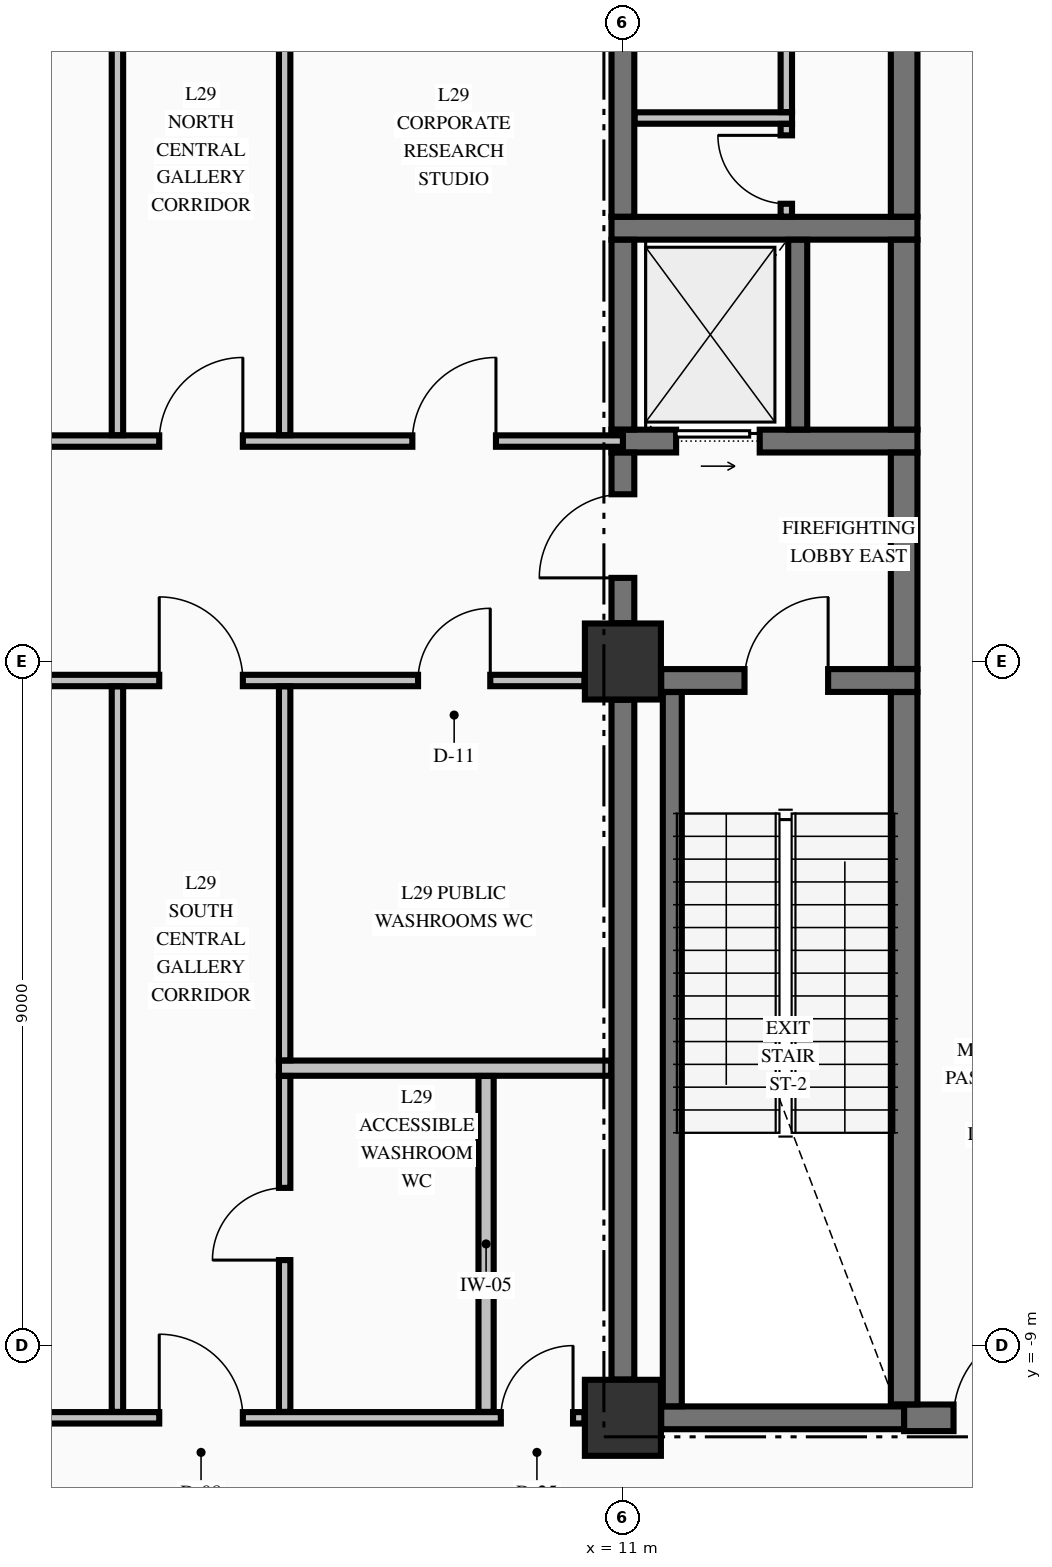
"""IFC4 building model, lengths in metres.
Left out: names, types, materials, properties, quantities, classifications, styles, units other than length and angle.
Written with IfcOpenShell. Run it as: python <this file> out.ifc"""

import sys

from ifc_helpers import new_model, si_unit, direction, frame, frame_2d, origin, origin_2d, place, context, subcontext, project, spatial, rectangle, extrude, element, fill, save


model = new_model("IFC4")
c1 = context("Model", 3, precision=1e-05, world=origin(), true_north=direction((0.0, 1.0)))
c2 = subcontext(c1, "Body", "Model", "MODEL_VIEW")
j1 = project(units=[si_unit("LENGTHUNIT", "METRE"), si_unit("PLANEANGLEUNIT", "RADIAN")], contexts=[c1])
p1 = place(None, origin())
s1 = spatial("IfcSite", under=j1, at=p1, CompositionType="ELEMENT")
p2 = place(p1, origin())
s2 = spatial("IfcBuilding", under=s1, at=p2, CompositionType="ELEMENT")
p3 = place(p2, frame((0.0, 0.0, 116.35)))
s3 = spatial("IfcBuildingStorey", under=s2, at=p3, CompositionType="ELEMENT", Elevation=116.35)
for number, where, z_axis, x_axis in (
    (1, (11.0, -9.95, -0.425), (0.0, 0.0, 1.0), (1.0, 0.0, 0.0)),
    (2, (11.0, 0.0, -0.425), (0.0, 0.0, 1.0), (1.0, 0.0, 0.0)),
):
    element("IfcColumn", number, at=place(p3, frame(where, z_axis=z_axis, x_axis=x_axis)), inside=s3, PredefinedType="COLUMN", context=c2, shape_type="SweptSolid", body=[
        extrude(rectangle(XDim=1.0, YDim=1.0, at=origin_2d()), origin(), (0.0, 0.0, 1.0), 5.0),
    ])
p4 = place(p3, frame((11.504, -9.95, 0.0), z_axis=(0.0, 0.0, 1.0), x_axis=(1.0, 0.0, 0.0)))
e3 = element("IfcWall", 3, at=p4, inside=s3, PredefinedType="SHEAR", context=c2, shape_type="SweptSolid", body=[
    extrude(rectangle(XDim=3.196, YDim=0.3, at=frame_2d((1.598, 0.0))), origin(), (0.0, 0.0, 1.0), 4.575),
])
p5 = place(p3, frame((14.7, -9.95, 0.0), z_axis=(0.0, 0.0, 1.0), x_axis=(1.0, 0.0, 0.0)))
e4 = element("IfcWall", 4, at=p5, inside=s3, PredefinedType="SHEAR", context=c2, shape_type="SweptSolid", body=[
    extrude(rectangle(XDim=4.796, YDim=0.35, at=frame_2d((2.398, 0.0))), origin(), (0.0, 0.0, 1.0), 4.575),
])
p6 = place(p5, frame((0.65, 0.0, 0.0)))
e5 = element("IfcOpeningElement", 5, at=p6, cuts=e4, PredefinedType="OPENING", context=c2, shape_type="SweptSolid", body=[
    extrude(rectangle(XDim=1.2, YDim=2.15, at=frame_2d((0.6, 1.075))), frame((0.0, 0.185, 0.0), z_axis=(0.0, -1.0, 0.0), x_axis=(1.0, 0.0, 0.0)), (0.0, 0.0, 1.0), 0.37),
])
p7 = place(p3, frame((11.504, -0.25, 0.0), z_axis=(0.0, 0.0, 1.0), x_axis=(1.0, 0.0, 0.0)))
e6 = element("IfcWall", 6, at=p7, inside=s3, PredefinedType="SHEAR", context=c2, shape_type="SweptSolid", body=[
    extrude(rectangle(XDim=3.371, YDim=0.3, at=frame_2d((1.686, 0.0))), origin(), (0.0, 0.0, 1.0), 4.575),
])
p8 = place(p7, frame((1.096, 0.0, 0.0)))
e7 = element("IfcOpeningElement", 7, at=p8, cuts=e6, PredefinedType="OPENING", context=c2, shape_type="SweptSolid", body=[
    extrude(rectangle(XDim=1.1, YDim=2.15, at=frame_2d((0.55, 1.075))), frame((0.0, 0.16, 0.0), z_axis=(0.0, -1.0, 0.0), x_axis=(1.0, 0.0, 0.0)), (0.0, 0.0, 1.0), 0.32),
])
p9 = place(p3, frame((10.85, 2.9, 0.0), z_axis=(0.0, 0.0, 1.0), x_axis=(1.0, 0.0, 0.0)))
e8 = element("IfcWall", 8, at=p9, inside=s3, PredefinedType="SHEAR", context=c2, shape_type="SweptSolid", body=[
    extrude(rectangle(XDim=4.025, YDim=0.3, at=frame_2d((2.012, 0.0))), origin(), (0.0, 0.0, 1.0), 4.575),
])
p10 = place(p9, frame((0.85, 0.0, 0.0)))
e9 = element("IfcOpeningElement", 9, at=p10, cuts=e8, PredefinedType="OPENING", context=c2, shape_type="SweptSolid", body=[
    extrude(rectangle(XDim=1.1, YDim=2.2, at=frame_2d((0.55, 1.1))), frame((0.0, 0.16, 0.0), z_axis=(0.0, -1.0, 0.0), x_axis=(1.0, 0.0, 0.0)), (0.0, 0.0, 1.0), 0.32),
])
p11 = place(p3, frame((10.85, 5.7, 0.0), z_axis=(0.0, 0.0, 1.0), x_axis=(1.0, 0.0, 0.0)))
e10 = element("IfcWall", 10, at=p11, inside=s3, PredefinedType="SHEAR", context=c2, shape_type="SweptSolid", body=[
    extrude(rectangle(XDim=4.025, YDim=0.3, at=frame_2d((2.012, 0.0))), origin(), (0.0, 0.0, 1.0), 4.575),
])
p12 = place(p3, frame((-10.494, -9.95, 0.0), z_axis=(0.0, 0.0, 1.0), x_axis=(1.0, 0.0, 0.0)))
e11 = element("IfcWall", 11, at=p12, inside=s3, PredefinedType="PARTITIONING", context=c2, shape_type="SweptSolid", body=[
    extrude(rectangle(XDim=20.988, YDim=0.15, at=frame_2d((10.494, 0.0))), origin(), (0.0, 0.0, 1.0), 4.575),
])
p13 = place(p12, frame((15.394, 0.0, 0.0)))
e12 = element("IfcOpeningElement", 12, at=p13, cuts=e11, PredefinedType="OPENING", context=c2, shape_type="SweptSolid", body=[
    extrude(rectangle(XDim=1.1, YDim=2.15, at=frame_2d((0.55, 1.075))), frame((0.0, 0.085, 0.0), z_axis=(0.0, -1.0, 0.0), x_axis=(1.0, 0.0, 0.0)), (0.0, 0.0, 1.0), 0.17),
])
p14 = place(p12, frame((19.888, 0.0, 0.0)))
e13 = element("IfcOpeningElement", 13, at=p14, cuts=e11, PredefinedType="OPENING", context=c2, shape_type="SweptSolid", body=[
    extrude(rectangle(XDim=0.95, YDim=2.02, at=frame_2d((0.475, 1.01))), frame((0.0, 0.085, 0.0), z_axis=(0.0, -1.0, 0.0), x_axis=(1.0, 0.0, 0.0)), (0.0, 0.0, 1.0), 0.17),
])
p15 = place(p3, frame((6.475, -5.35, 0.0), z_axis=(0.0, 0.0, 1.0), x_axis=(1.0, 0.0, 0.0)))
e14 = element("IfcWall", 14, at=p15, inside=s3, PredefinedType="PARTITIONING", context=c2, shape_type="SweptSolid", body=[
    extrude(rectangle(XDim=4.372, YDim=0.2, at=frame_2d((2.186, 0.0))), origin(), (0.0, 0.0, 1.0), 4.575),
])
p16 = place(p3, frame((-10.494, -0.25, 0.0), z_axis=(0.0, 0.0, 1.0), x_axis=(1.0, 0.0, 0.0)))
e15 = element("IfcWall", 15, at=p16, inside=s3, PredefinedType="PARTITIONING", context=c2, shape_type="SweptSolid", body=[
    extrude(rectangle(XDim=20.988, YDim=0.15, at=frame_2d((10.494, 0.0))), origin(), (0.0, 0.0, 1.0), 4.575),
])
p17 = place(p16, frame((15.394, 0.0, 0.0)))
e16 = element("IfcOpeningElement", 16, at=p17, cuts=e15, PredefinedType="OPENING", context=c2, shape_type="SweptSolid", body=[
    extrude(rectangle(XDim=1.1, YDim=2.15, at=frame_2d((0.55, 1.075))), frame((0.0, 0.085, 0.0), z_axis=(0.0, -1.0, 0.0), x_axis=(1.0, 0.0, 0.0)), (0.0, 0.0, 1.0), 0.17),
])
p18 = place(p16, frame((6.639, 0.0, 0.0)))
e17 = element("IfcOpeningElement", 17, at=p18, cuts=e15, PredefinedType="OPENING", context=c2, shape_type="SweptSolid", body=[
    extrude(rectangle(XDim=1.05, YDim=2.15, at=frame_2d((0.525, 1.075))), frame((0.0, 0.085, 0.0), z_axis=(0.0, -1.0, 0.0), x_axis=(1.0, 0.0, 0.0)), (0.0, 0.0, 1.0), 0.17),
])
p19 = place(p16, frame((18.799, 0.0, 0.0)))
e18 = element("IfcOpeningElement", 18, at=p19, cuts=e15, PredefinedType="OPENING", context=c2, shape_type="SweptSolid", body=[
    extrude(rectangle(XDim=0.95, YDim=2.15, at=frame_2d((0.475, 1.075))), frame((0.0, 0.085, 0.0), z_axis=(0.0, -1.0, 0.0), x_axis=(1.0, 0.0, 0.0)), (0.0, 0.0, 1.0), 0.17),
])
p20 = place(p3, frame((-11.0, 2.9, 0.0), z_axis=(0.0, 0.0, 1.0), x_axis=(1.0, 0.0, 0.0)))
e19 = element("IfcWall", 19, at=p20, inside=s3, PredefinedType="PARTITIONING", context=c2, shape_type="SweptSolid", body=[
    extrude(rectangle(XDim=22.0, YDim=0.15, at=frame_2d((11.0, 0.0))), origin(), (0.0, 0.0, 1.0), 4.575),
])
p21 = place(p20, frame((15.9, 0.0, 0.0)))
e20 = element("IfcOpeningElement", 20, at=p21, cuts=e19, PredefinedType="OPENING", context=c2, shape_type="SweptSolid", body=[
    extrude(rectangle(XDim=1.1, YDim=2.15, at=frame_2d((0.55, 1.075))), frame((0.0, 0.085, 0.0), z_axis=(0.0, -1.0, 0.0), x_axis=(1.0, 0.0, 0.0)), (0.0, 0.0, 1.0), 0.17),
])
p22 = place(p20, frame((7.145, 0.0, 0.0)))
e21 = element("IfcOpeningElement", 21, at=p22, cuts=e19, PredefinedType="OPENING", context=c2, shape_type="SweptSolid", body=[
    extrude(rectangle(XDim=1.05, YDim=2.15, at=frame_2d((0.525, 1.075))), frame((0.0, 0.085, 0.0), z_axis=(0.0, -1.0, 0.0), x_axis=(1.0, 0.0, 0.0)), (0.0, 0.0, 1.0), 0.17),
])
p23 = place(p20, frame((19.23, 0.0, 0.0)))
e22 = element("IfcOpeningElement", 22, at=p23, cuts=e19, PredefinedType="OPENING", context=c2, shape_type="SweptSolid", body=[
    extrude(rectangle(XDim=1.1, YDim=2.15, at=frame_2d((0.55, 1.075))), frame((0.0, 0.085, 0.0), z_axis=(0.0, -1.0, 0.0), x_axis=(1.0, 0.0, 0.0)), (0.0, 0.0, 1.0), 0.17),
])
p24 = place(p3, frame((11.153, 7.15, 0.0), z_axis=(0.0, 0.0, 1.0), x_axis=(1.0, 0.0, 0.0)))
e23 = element("IfcWall", 23, at=p24, inside=s3, PredefinedType="PARTITIONING", context=c2, shape_type="SweptSolid", body=[
    extrude(rectangle(XDim=2.072, YDim=0.15, at=frame_2d((1.036, 0.0))), origin(), (0.0, 0.0, 1.0), 4.575),
])
p25 = place(p3, frame((11.0, -9.446, 0.0), z_axis=(0.0, 0.0, 1.0), x_axis=(0.0, 1.0, 0.0)))
e24 = element("IfcWall", 24, at=p25, inside=s3, PredefinedType="SHEAR", context=c2, shape_type="SweptSolid", body=[
    extrude(rectangle(XDim=8.942, YDim=0.3, at=frame_2d((4.471, 0.0))), origin(), (0.0, 0.0, 1.0), 4.575),
])
p26 = place(p3, frame((11.0, 0.504, 0.0), z_axis=(0.0, 0.0, 1.0), x_axis=(0.0, 1.0, 0.0)))
e25 = element("IfcWall", 25, at=p26, inside=s3, PredefinedType="SHEAR", context=c2, shape_type="SweptSolid", body=[
    extrude(rectangle(XDim=2.244, YDim=0.3, at=frame_2d((1.122, 0.0))), origin(), (0.0, 0.0, 1.0), 4.575),
])
p27 = place(p26, frame((0.596, 0.0, 0.0)))
e26 = element("IfcOpeningElement", 26, at=p27, cuts=e25, PredefinedType="OPENING", context=c2, shape_type="SweptSolid", body=[
    extrude(rectangle(XDim=1.1, YDim=2.15, at=frame_2d((0.55, 1.075))), frame((0.0, 0.16, 0.0), z_axis=(0.0, -1.0, 0.0), x_axis=(1.0, 0.0, 0.0)), (0.0, 0.0, 1.0), 0.32),
])
p28 = place(p3, frame((11.0, 3.052, 0.0), z_axis=(0.0, 0.0, 1.0), x_axis=(0.0, 1.0, 0.0)))
e27 = element("IfcWall", 27, at=p28, inside=s3, PredefinedType="SHEAR", context=c2, shape_type="SweptSolid", body=[
    extrude(rectangle(XDim=2.496, YDim=0.3, at=frame_2d((1.248, 0.0))), origin(), (0.0, 0.0, 1.0), 4.575),
])
p29 = place(p3, frame((11.0, 5.852, 0.0), z_axis=(0.0, 0.0, 1.0), x_axis=(0.0, 1.0, 0.0)))
e28 = element("IfcWall", 28, at=p29, inside=s3, PredefinedType="SHEAR", context=c2, shape_type="SweptSolid", body=[
    extrude(rectangle(XDim=4.144, YDim=0.3, at=frame_2d((2.072, 0.0))), origin(), (0.0, 0.0, 1.0), 4.575),
])
p30 = place(p3, frame((11.65, -9.798, 0.0), z_axis=(0.0, 0.0, 1.0), x_axis=(0.0, 1.0, 0.0)))
e29 = element("IfcWall", 29, at=p30, inside=s3, PredefinedType="SOLIDWALL", context=c2, shape_type="SweptSolid", body=[
    extrude(rectangle(XDim=9.396, YDim=0.25, at=frame_2d((4.698, 0.0))), origin(), (0.0, 0.0, 1.0), 4.575),
])
p31 = place(p3, frame((13.3, 3.052, 0.0), z_axis=(0.0, 0.0, 1.0), x_axis=(0.0, 1.0, 0.0)))
e30 = element("IfcWall", 30, at=p31, inside=s3, PredefinedType="SOLIDWALL", context=c2, shape_type="SweptSolid", body=[
    extrude(rectangle(XDim=2.496, YDim=0.25, at=frame_2d((1.248, 0.0))), origin(), (0.0, 0.0, 1.0), 4.575),
])
p32 = place(p3, frame((14.7, -9.773, 0.0), z_axis=(0.0, 0.0, 1.0), x_axis=(0.0, 1.0, 0.0)))
e31 = element("IfcWall", 31, at=p32, inside=s3, PredefinedType="SHEAR", context=c2, shape_type="SweptSolid", body=[
    extrude(rectangle(XDim=9.371, YDim=0.35, at=frame_2d((4.686, 0.0))), origin(), (0.0, 0.0, 1.0), 4.575),
])
p33 = place(p3, frame((14.7, -0.098, 0.0), z_axis=(0.0, 0.0, 1.0), x_axis=(0.0, 1.0, 0.0)))
e32 = element("IfcWall", 32, at=p33, inside=s3, PredefinedType="SHEAR", context=c2, shape_type="SweptSolid", body=[
    extrude(rectangle(XDim=2.846, YDim=0.35, at=frame_2d((1.423, 0.0))), origin(), (0.0, 0.0, 1.0), 4.575),
])
p34 = place(p3, frame((14.7, 3.052, 0.0), z_axis=(0.0, 0.0, 1.0), x_axis=(0.0, 1.0, 0.0)))
e33 = element("IfcWall", 33, at=p34, inside=s3, PredefinedType="SHEAR", context=c2, shape_type="SweptSolid", body=[
    extrude(rectangle(XDim=2.496, YDim=0.35, at=frame_2d((1.248, 0.0))), origin(), (0.0, 0.0, 1.0), 4.575),
])
p35 = place(p3, frame((14.7, 5.852, 0.0), z_axis=(0.0, 0.0, 1.0), x_axis=(0.0, 1.0, 0.0)))
e34 = element("IfcWall", 34, at=p35, inside=s3, PredefinedType="SHEAR", context=c2, shape_type="SweptSolid", body=[
    extrude(rectangle(XDim=4.471, YDim=0.35, at=frame_2d((2.235, 0.0))), origin(), (0.0, 0.0, 1.0), 4.575),
])
p36 = place(p3, frame((4.35, -9.872, 0.0), z_axis=(0.0, 0.0, 1.0), x_axis=(0.0, 1.0, 0.0)))
e35 = element("IfcWall", 35, at=p36, inside=s3, PredefinedType="PARTITIONING", context=c2, shape_type="SweptSolid", body=[
    extrude(rectangle(XDim=9.544, YDim=0.15, at=frame_2d((4.772, 0.0))), origin(), (0.0, 0.0, 1.0), 4.575),
])
p37 = place(p3, frame((4.35, 2.978, 0.0), z_axis=(0.0, 0.0, 1.0), x_axis=(0.0, 1.0, 0.0)))
e36 = element("IfcWall", 36, at=p37, inside=s3, PredefinedType="PARTITIONING", context=c2, shape_type="SweptSolid", body=[
    extrude(rectangle(XDim=7.444, YDim=0.15, at=frame_2d((3.722, 0.0))), origin(), (0.0, 0.0, 1.0), 4.575),
])
p38 = place(p3, frame((6.55, -9.872, 0.0), z_axis=(0.0, 0.0, 1.0), x_axis=(0.0, 1.0, 0.0)))
e37 = element("IfcWall", 37, at=p38, inside=s3, PredefinedType="PARTITIONING", context=c2, shape_type="SweptSolid", body=[
    extrude(rectangle(XDim=4.419, YDim=0.15, at=frame_2d((2.209, 0.0))), origin(), (0.0, 0.0, 1.0), 4.575),
])
p39 = place(p38, frame((1.997, 0.0, 0.0)))
e38 = element("IfcOpeningElement", 38, at=p39, cuts=e37, PredefinedType="OPENING", context=c2, shape_type="SweptSolid", body=[
    extrude(rectangle(XDim=0.95, YDim=2.15, at=frame_2d((0.475, 1.075))), frame((0.0, 0.085, 0.0), z_axis=(0.0, -1.0, 0.0), x_axis=(1.0, 0.0, 0.0)), (0.0, 0.0, 1.0), 0.17),
])
p40 = place(p3, frame((6.55, -5.247, 0.0), z_axis=(0.0, 0.0, 1.0), x_axis=(0.0, 1.0, 0.0)))
e39 = element("IfcWall", 39, at=p40, inside=s3, PredefinedType="PARTITIONING", context=c2, shape_type="SweptSolid", body=[
    extrude(rectangle(XDim=4.919, YDim=0.15, at=frame_2d((2.459, 0.0))), origin(), (0.0, 0.0, 1.0), 4.575),
])
p41 = place(p3, frame((6.55, 2.978, 0.0), z_axis=(0.0, 0.0, 1.0), x_axis=(0.0, 1.0, 0.0)))
e40 = element("IfcWall", 40, at=p41, inside=s3, PredefinedType="PARTITIONING", context=c2, shape_type="SweptSolid", body=[
    extrude(rectangle(XDim=7.444, YDim=0.15, at=frame_2d((3.722, 0.0))), origin(), (0.0, 0.0, 1.0), 4.575),
])
p42 = place(p3, frame((9.2, -9.872, 0.0), z_axis=(0.0, 0.0, 1.0), x_axis=(0.0, 1.0, 0.0)))
e41 = element("IfcWall", 41, at=p42, inside=s3, PredefinedType="PARTITIONING", context=c2, shape_type="SweptSolid", body=[
    extrude(rectangle(XDim=4.419, YDim=0.2, at=frame_2d((2.209, 0.0))), origin(), (0.0, 0.0, 1.0), 4.575),
])
p43 = place(p3, frame((13.15, 5.853, 0.0), z_axis=(0.0, 0.0, 1.0), x_axis=(0.0, 1.0, 0.0)))
e42 = element("IfcWall", 42, at=p43, inside=s3, PredefinedType="PARTITIONING", context=c2, shape_type="SweptSolid", body=[
    extrude(rectangle(XDim=1.219, YDim=0.15, at=frame_2d((0.609, 0.0))), origin(), (0.0, 0.0, 1.0), 4.575),
])
p44 = place(p43, frame((0.169, 0.0, 0.0)))
e43 = element("IfcOpeningElement", 43, at=p44, cuts=e42, PredefinedType="OPENING", context=c2, shape_type="SweptSolid", body=[
    extrude(rectangle(XDim=0.9, YDim=2.15, at=frame_2d((0.45, 1.075))), frame((0.0, 0.085, 0.0), z_axis=(0.0, -1.0, 0.0), x_axis=(1.0, 0.0, 0.0)), (0.0, 0.0, 1.0), 0.17),
])
p45 = place(p3, frame((13.15, 7.228, 0.0), z_axis=(0.0, 0.0, 1.0), x_axis=(0.0, 1.0, 0.0)))
e44 = element("IfcWall", 44, at=p45, inside=s3, PredefinedType="PARTITIONING", context=c2, shape_type="SweptSolid", body=[
    extrude(rectangle(XDim=3.119, YDim=0.15, at=frame_2d((1.56, 0.0))), origin(), (0.0, 0.0, 1.0), 4.575),
])
p46 = place(p45, frame((1.097, 0.0, 0.0)))
e45 = element("IfcOpeningElement", 45, at=p46, cuts=e44, PredefinedType="OPENING", context=c2, shape_type="SweptSolid", body=[
    extrude(rectangle(XDim=0.95, YDim=2.15, at=frame_2d((0.475, 1.075))), frame((0.0, 0.085, 0.0), z_axis=(0.0, -1.0, 0.0), x_axis=(1.0, 0.0, 0.0)), (0.0, 0.0, 1.0), 0.17),
])
p47 = place(p8, origin())
e46 = element("IfcDoor", 46, at=p47, inside=s3, OperationType="SINGLE_SWING_RIGHT", PredefinedType="DOOR", context=c2, shape_type="SweptSolid", body=[
    extrude(rectangle(XDim=1.1, YDim=2.15, at=frame_2d((0.55, 1.075))), frame((0.0, 0.025, 0.0), z_axis=(0.0, -1.0, 0.0), x_axis=(1.0, 0.0, 0.0)), (0.0, 0.0, 1.0), 0.05),
])
fill(e7, e46)
p48 = place(p27, origin())
e47 = element("IfcDoor", 47, at=p48, inside=s3, OperationType="SINGLE_SWING_LEFT", PredefinedType="DOOR", context=c2, shape_type="SweptSolid", body=[
    extrude(rectangle(XDim=1.1, YDim=2.15, at=frame_2d((0.55, 1.075))), frame((0.0, 0.025, 0.0), z_axis=(0.0, -1.0, 0.0), x_axis=(1.0, 0.0, 0.0)), (0.0, 0.0, 1.0), 0.05),
])
fill(e26, e47)
p49 = place(p10, origin())
e48 = element("IfcDoor", 48, at=p49, inside=s3, OperationType="SLIDING_TO_RIGHT", PredefinedType="DOOR", context=c2, shape_type="SweptSolid", body=[
    extrude(rectangle(XDim=1.1, YDim=2.2, at=frame_2d((0.55, 1.1))), frame((0.0, 0.025, 0.0), z_axis=(0.0, -1.0, 0.0), x_axis=(1.0, 0.0, 0.0)), (0.0, 0.0, 1.0), 0.05),
])
fill(e9, e48)
p50 = place(p44, origin())
e49 = element("IfcDoor", 49, at=p50, inside=s3, OperationType="SINGLE_SWING_RIGHT", PredefinedType="DOOR", context=c2, shape_type="SweptSolid", body=[
    extrude(rectangle(XDim=0.9, YDim=2.15, at=frame_2d((0.45, 1.075))), frame((0.0, 0.025, 0.0), z_axis=(0.0, -1.0, 0.0), x_axis=(1.0, 0.0, 0.0)), (0.0, 0.0, 1.0), 0.05),
])
fill(e43, e49)
p51 = place(p6, origin())
e50 = element("IfcDoor", 50, at=p51, inside=s3, OperationType="SINGLE_SWING_RIGHT", PredefinedType="DOOR", context=c2, shape_type="SweptSolid", body=[
    extrude(rectangle(XDim=1.2, YDim=2.15, at=frame_2d((0.6, 1.075))), frame((0.0, 0.025, 0.0), z_axis=(0.0, -1.0, 0.0), x_axis=(1.0, 0.0, 0.0)), (0.0, 0.0, 1.0), 0.05),
])
fill(e5, e50)
p52 = place(p13, origin())
e51 = element("IfcDoor", 51, at=p52, inside=s3, OperationType="SINGLE_SWING_LEFT", PredefinedType="DOOR", context=c2, shape_type="SweptSolid", body=[
    extrude(rectangle(XDim=1.1, YDim=2.15, at=frame_2d((0.55, 1.075))), frame((0.0, 0.025, 0.0), z_axis=(0.0, -1.0, 0.0), x_axis=(1.0, 0.0, 0.0)), (0.0, 0.0, 1.0), 0.05),
])
fill(e12, e51)
p53 = place(p21, origin())
e52 = element("IfcDoor", 52, at=p53, inside=s3, OperationType="SINGLE_SWING_RIGHT", PredefinedType="DOOR", context=c2, shape_type="SweptSolid", body=[
    extrude(rectangle(XDim=1.1, YDim=2.15, at=frame_2d((0.55, 1.075))), frame((0.0, 0.025, 0.0), z_axis=(0.0, -1.0, 0.0), x_axis=(1.0, 0.0, 0.0)), (0.0, 0.0, 1.0), 0.05),
])
fill(e20, e52)
p54 = place(p17, origin())
e53 = element("IfcDoor", 53, at=p54, inside=s3, OperationType="SINGLE_SWING_LEFT", PredefinedType="DOOR", context=c2, shape_type="SweptSolid", body=[
    extrude(rectangle(XDim=1.1, YDim=2.15, at=frame_2d((0.55, 1.075))), frame((0.0, 0.025, 0.0), z_axis=(0.0, -1.0, 0.0), x_axis=(1.0, 0.0, 0.0)), (0.0, 0.0, 1.0), 0.05),
])
fill(e16, e53)
p55 = place(p23, origin())
e54 = element("IfcDoor", 54, at=p55, inside=s3, OperationType="SINGLE_SWING_RIGHT", PredefinedType="DOOR", context=c2, shape_type="SweptSolid", body=[
    extrude(rectangle(XDim=1.1, YDim=2.15, at=frame_2d((0.55, 1.075))), frame((0.0, 0.025, 0.0), z_axis=(0.0, -1.0, 0.0), x_axis=(1.0, 0.0, 0.0)), (0.0, 0.0, 1.0), 0.05),
])
fill(e22, e54)
p56 = place(p19, origin())
e55 = element("IfcDoor", 55, at=p56, inside=s3, OperationType="SINGLE_SWING_RIGHT", PredefinedType="DOOR", context=c2, shape_type="SweptSolid", body=[
    extrude(rectangle(XDim=0.95, YDim=2.15, at=frame_2d((0.475, 1.075))), frame((0.0, 0.025, 0.0), z_axis=(0.0, -1.0, 0.0), x_axis=(1.0, 0.0, 0.0)), (0.0, 0.0, 1.0), 0.05),
])
fill(e18, e55)
p57 = place(p39, origin())
e56 = element("IfcDoor", 56, at=p57, inside=s3, OperationType="SINGLE_SWING_LEFT", PredefinedType="DOOR", context=c2, shape_type="SweptSolid", body=[
    extrude(rectangle(XDim=0.95, YDim=2.15, at=frame_2d((0.475, 1.075))), frame((0.0, 0.025, 0.0), z_axis=(0.0, -1.0, 0.0), x_axis=(1.0, 0.0, 0.0)), (0.0, 0.0, 1.0), 0.05),
])
fill(e38, e56)
p58 = place(p14, origin())
e57 = element("IfcDoor", 57, at=p58, inside=s3, OperationType="SINGLE_SWING_RIGHT", PredefinedType="DOOR", context=c2, shape_type="SweptSolid", body=[
    extrude(rectangle(XDim=0.95, YDim=2.02, at=frame_2d((0.475, 1.01))), frame((0.0, 0.025, 0.0), z_axis=(0.0, -1.0, 0.0), x_axis=(1.0, 0.0, 0.0)), (0.0, 0.0, 1.0), 0.05),
])
fill(e13, e57)
save(model, sys.argv[1])
